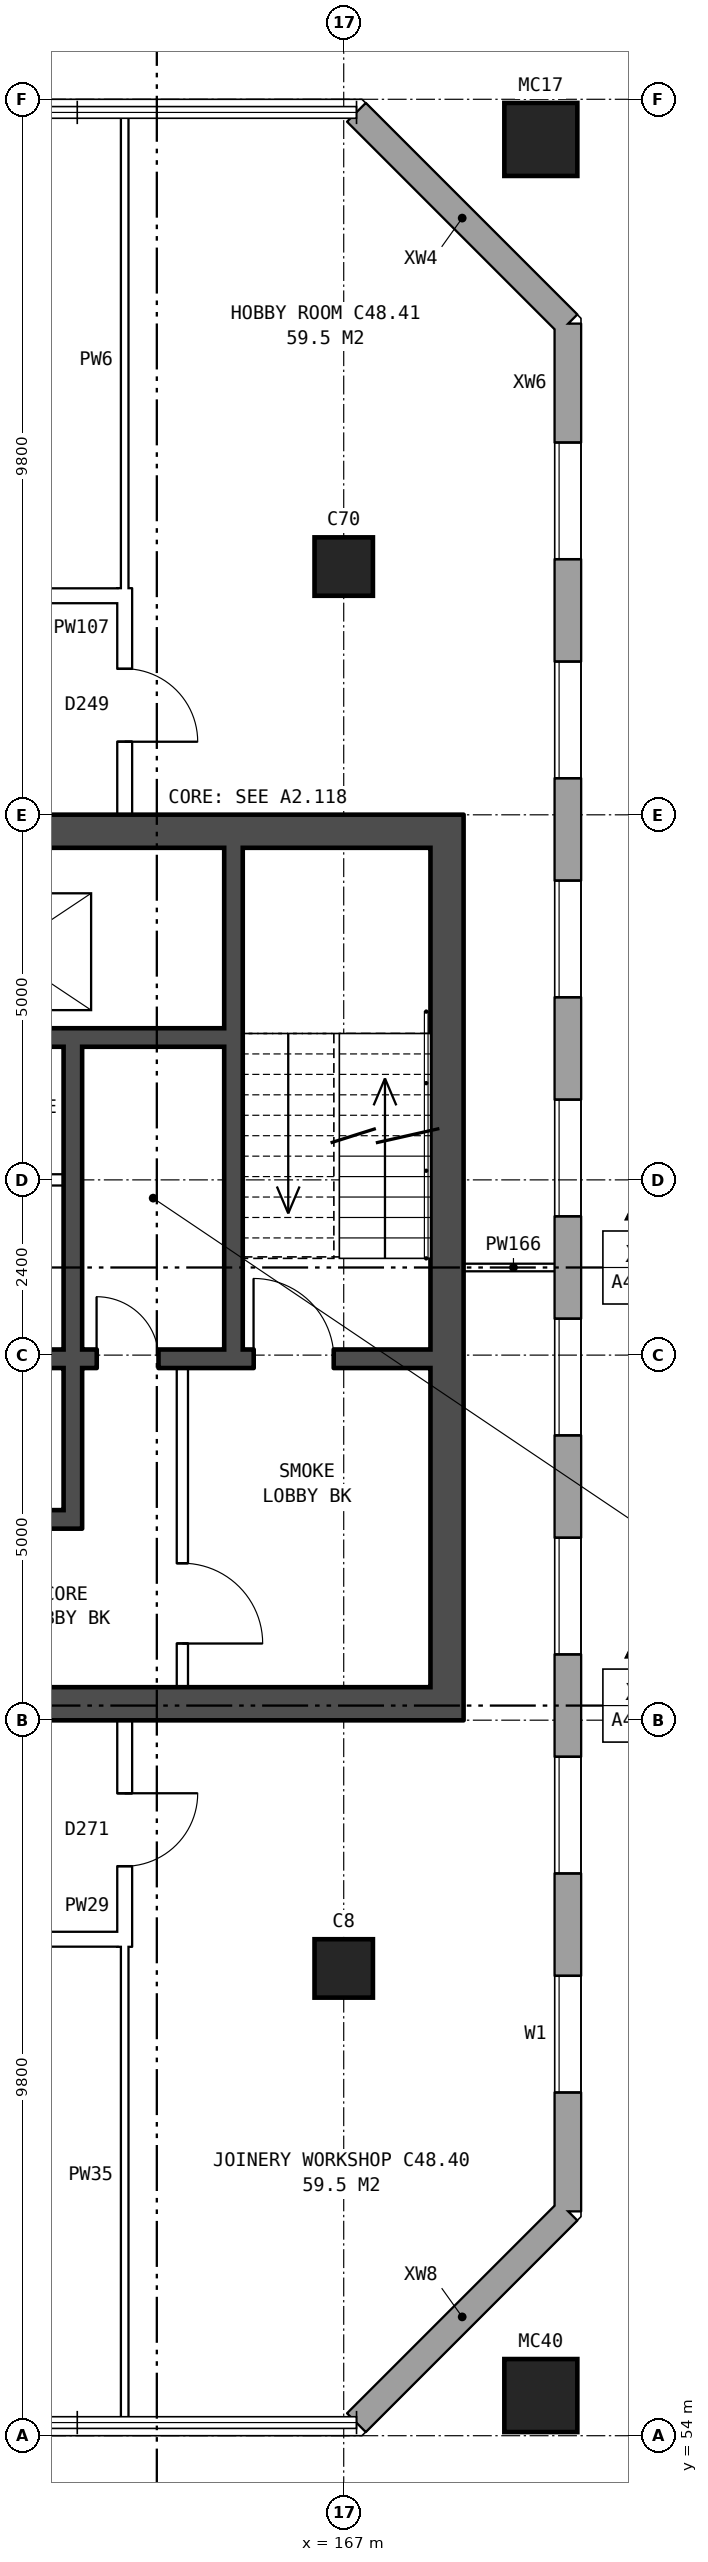
"""IFC4 building model, lengths in metres.
Left out: names, types, materials, properties, quantities, classifications, styles, units other than length and angle.
Written with IfcOpenShell. Run it as: python <this file> out.ifc"""

import sys

from ifc_helpers import new_model, si_unit, direction, frame, frame_2d, origin, origin_2d, place, context, subcontext, project, spatial, rectangle, hollow_rectangle, extrude, element, fill, save


model = new_model("IFC4")
c1 = context("Model", 3, precision=1e-05, world=origin(), true_north=direction((0.0, 1.0)))
c2 = subcontext(c1, "Body", "Model", "MODEL_VIEW")
j1 = project(units=[si_unit("LENGTHUNIT", "METRE"), si_unit("PLANEANGLEUNIT", "RADIAN")], contexts=[c1])
p1 = place(None, origin())
s1 = spatial("IfcSite", under=j1, at=p1, CompositionType="ELEMENT")
p2 = place(p1, origin())
s2 = spatial("IfcBuilding", under=s1, at=p2, CompositionType="ELEMENT")
p3 = place(p2, frame((0.0, 0.0, 171.6)))
s3 = spatial("IfcBuildingStorey", under=s2, at=p3, CompositionType="ELEMENT", Elevation=171.6)
for number, where, z_axis, x_axis in (
    (1, (167.0, 60.4, 0.0), (0.0, 0.0, 1.0), (1.0, 0.0, 0.0)),
    (2, (167.0, 79.6, 0.0), (0.0, 0.0, 1.0), (1.0, 0.0, 0.0)),
):
    element("IfcColumn", number, at=place(p3, frame(where, z_axis=z_axis, x_axis=x_axis)), inside=s3, PredefinedType="COLUMN", context=c2, shape_type="SweptSolid", body=[
        extrude(rectangle(XDim=0.8, YDim=0.8, at=origin_2d()), origin(), (0.0, 0.0, 1.0), 3.6),
    ])
for number, where, z_axis, x_axis in (
    (3, (169.7, 54.55, 0.0), (0.0, 0.0, 1.0), (1.0, 0.0, 0.0)),
    (4, (169.7, 85.45, 0.0), (0.0, 0.0, 1.0), (1.0, 0.0, 0.0)),
):
    element("IfcColumn", number, at=place(p3, frame(where, z_axis=z_axis, x_axis=x_axis)), inside=s3, PredefinedType="COLUMN", context=c2, shape_type="SweptSolid", body=[
        extrude(hollow_rectangle(XDim=1.0, YDim=1.0, WallThickness=0.055, at=origin_2d()), origin(), (0.0, 0.0, 1.0), 4.2),
    ])
p4 = place(p3, frame((167.175, 54.18, 0.0), z_axis=(0.0, 0.0, 1.0), x_axis=(0.707106781187, 0.707106781187, 0.0)))
e5 = element("IfcWall", 5, at=p4, inside=s3, PredefinedType="STANDARD", context=c2, shape_type="SweptSolid", body=[
    extrude(rectangle(XDim=4.094, YDim=0.36, at=frame_2d((2.047, 0.0))), origin(), (0.0, 0.0, 1.0), 3.6),
])
p5 = place(p3, frame((170.07, 57.075, 0.0), z_axis=(0.0, 0.0, 1.0), x_axis=(0.0, 1.0, 0.0)))
e6 = element("IfcWall", 6, at=p5, inside=s3, PredefinedType="STANDARD", context=c2, shape_type="SweptSolid", body=[
    extrude(rectangle(XDim=25.851, YDim=0.36, at=frame_2d((12.925, 0.0))), origin(), (0.0, 0.0, 1.0), 3.6),
])
p6 = place(p5, frame((1.625, 0.0, 0.8)))
e7 = element("IfcOpeningElement", 7, at=p6, cuts=e6, PredefinedType="OPENING", context=c2, shape_type="SweptSolid", body=[
    extrude(rectangle(XDim=1.6, YDim=1.8, at=frame_2d((0.8, 0.9))), frame((0.0, 0.19, 0.0), z_axis=(0.0, -1.0, 0.0), x_axis=(1.0, 0.0, 0.0)), (0.0, 0.0, 1.0), 0.38),
])
p7 = place(p5, frame((4.625, 0.0, 0.8)))
e8 = element("IfcOpeningElement", 8, at=p7, cuts=e6, PredefinedType="OPENING", context=c2, shape_type="SweptSolid", body=[
    extrude(rectangle(XDim=1.6, YDim=1.8, at=frame_2d((0.8, 0.9))), frame((0.0, 0.19, 0.0), z_axis=(0.0, -1.0, 0.0), x_axis=(1.0, 0.0, 0.0)), (0.0, 0.0, 1.0), 0.38),
])
p8 = place(p5, frame((7.625, 0.0, 0.8)))
e9 = element("IfcOpeningElement", 9, at=p8, cuts=e6, PredefinedType="OPENING", context=c2, shape_type="SweptSolid", body=[
    extrude(rectangle(XDim=1.6, YDim=1.8, at=frame_2d((0.8, 0.9))), frame((0.0, 0.19, 0.0), z_axis=(0.0, -1.0, 0.0), x_axis=(1.0, 0.0, 0.0)), (0.0, 0.0, 1.0), 0.38),
])
p9 = place(p5, frame((10.625, 0.0, 0.8)))
e10 = element("IfcOpeningElement", 10, at=p9, cuts=e6, PredefinedType="OPENING", context=c2, shape_type="SweptSolid", body=[
    extrude(rectangle(XDim=1.6, YDim=1.8, at=frame_2d((0.8, 0.9))), frame((0.0, 0.19, 0.0), z_axis=(0.0, -1.0, 0.0), x_axis=(1.0, 0.0, 0.0)), (0.0, 0.0, 1.0), 0.38),
])
p10 = place(p5, frame((13.625, 0.0, 0.8)))
e11 = element("IfcOpeningElement", 11, at=p10, cuts=e6, PredefinedType="OPENING", context=c2, shape_type="SweptSolid", body=[
    extrude(rectangle(XDim=1.6, YDim=1.8, at=frame_2d((0.8, 0.9))), frame((0.0, 0.19, 0.0), z_axis=(0.0, -1.0, 0.0), x_axis=(1.0, 0.0, 0.0)), (0.0, 0.0, 1.0), 0.38),
])
p11 = place(p5, frame((16.625, 0.0, 0.8)))
e12 = element("IfcOpeningElement", 12, at=p11, cuts=e6, PredefinedType="OPENING", context=c2, shape_type="SweptSolid", body=[
    extrude(rectangle(XDim=1.6, YDim=1.8, at=frame_2d((0.8, 0.9))), frame((0.0, 0.19, 0.0), z_axis=(0.0, -1.0, 0.0), x_axis=(1.0, 0.0, 0.0)), (0.0, 0.0, 1.0), 0.38),
])
p12 = place(p5, frame((19.625, 0.0, 0.8)))
e13 = element("IfcOpeningElement", 13, at=p12, cuts=e6, PredefinedType="OPENING", context=c2, shape_type="SweptSolid", body=[
    extrude(rectangle(XDim=1.6, YDim=1.8, at=frame_2d((0.8, 0.9))), frame((0.0, 0.19, 0.0), z_axis=(0.0, -1.0, 0.0), x_axis=(1.0, 0.0, 0.0)), (0.0, 0.0, 1.0), 0.38),
])
p13 = place(p5, frame((22.625, 0.0, 0.8)))
e14 = element("IfcOpeningElement", 14, at=p13, cuts=e6, PredefinedType="OPENING", context=c2, shape_type="SweptSolid", body=[
    extrude(rectangle(XDim=1.6, YDim=1.8, at=frame_2d((0.8, 0.9))), frame((0.0, 0.19, 0.0), z_axis=(0.0, -1.0, 0.0), x_axis=(1.0, 0.0, 0.0)), (0.0, 0.0, 1.0), 0.38),
])
p14 = place(p3, frame((170.07, 82.925, 0.0), z_axis=(0.0, 0.0, 1.0), x_axis=(-0.707106781187, 0.707106781187, 0.0)))
e15 = element("IfcWall", 15, at=p14, inside=s3, PredefinedType="STANDARD", context=c2, shape_type="SweptSolid", body=[
    extrude(rectangle(XDim=4.094, YDim=0.36, at=frame_2d((2.047, 0.0))), origin(), (0.0, 0.0, 1.0), 3.6),
])
p15 = place(p3, frame((168.415, 76.2, 0.0), z_axis=(0.0, 0.0, 1.0), x_axis=(0.0, -1.0, 0.0)))
e16 = element("IfcWall", 16, at=p15, inside=s3, PredefinedType="SHEAR", context=c2, shape_type="SweptSolid", body=[
    extrude(rectangle(XDim=12.4, YDim=0.45, at=frame_2d((6.2, 0.0))), origin(), (0.0, 0.0, 1.0), 3.6),
])
for number, where, z_axis, x_axis in (
    (17, (160.69, 75.975, 0.0), (0.0, 0.0, 1.0), (1.0, 0.0, 0.0)),
    (18, (160.69, 64.025, 0.0), (0.0, 0.0, 1.0), (1.0, 0.0, 0.0)),
):
    element("IfcWall", number, at=place(p3, frame(where, z_axis=z_axis, x_axis=x_axis)), inside=s3, PredefinedType="SHEAR", context=c2, shape_type="SweptSolid", body=[
        extrude(rectangle(XDim=7.5, YDim=0.45, at=frame_2d((3.75, 0.0))), origin(), (0.0, 0.0, 1.0), 3.6),
    ])
p16 = place(p3, frame((160.69, 73.15, 0.0), z_axis=(0.0, 0.0, 1.0), x_axis=(1.0, 0.0, 0.0)))
e19 = element("IfcWall", 19, at=p16, inside=s3, PredefinedType="SHEAR", context=c2, shape_type="SweptSolid", body=[
    extrude(rectangle(XDim=4.675, YDim=0.25, at=frame_2d((2.337, 0.0))), origin(), (0.0, 0.0, 1.0), 3.6),
])
p17 = place(p3, frame((160.69, 71.2, 0.0), z_axis=(0.0, 0.0, 1.0), x_axis=(1.0, 0.0, 0.0)))
e20 = element("IfcWall", 20, at=p17, inside=s3, PredefinedType="PARTITIONING", context=c2, shape_type="SweptSolid", body=[
    extrude(rectangle(XDim=2.475, YDim=0.15, at=frame_2d((1.238, 0.0))), origin(), (0.0, 0.0, 1.0), 3.6),
])
p18 = place(p3, frame((160.69, 68.75, 0.0), z_axis=(0.0, 0.0, 1.0), x_axis=(1.0, 0.0, 0.0)))
e21 = element("IfcWall", 21, at=p18, inside=s3, PredefinedType="SHEAR", context=c2, shape_type="SweptSolid", body=[
    extrude(rectangle(XDim=7.5, YDim=0.25, at=frame_2d((3.75, 0.0))), origin(), (0.0, 0.0, 1.0), 3.6),
])
p19 = place(p18, frame((5.075, 0.0, 0.0)))
e22 = element("IfcOpeningElement", 22, at=p19, cuts=e21, PredefinedType="OPENING", context=c2, shape_type="SweptSolid", body=[
    extrude(rectangle(XDim=1.1, YDim=2.1, at=frame_2d((0.55, 1.05))), frame((0.0, 0.135, 0.0), z_axis=(0.0, -1.0, 0.0), x_axis=(1.0, 0.0, 0.0)), (0.0, 0.0, 1.0), 0.27),
])
p20 = place(p18, frame((2.925, 0.0, 0.0)))
e23 = element("IfcOpeningElement", 23, at=p20, cuts=e21, PredefinedType="OPENING", context=c2, shape_type="SweptSolid", body=[
    extrude(rectangle(XDim=0.85, YDim=2.1, at=frame_2d((0.425, 1.05))), frame((0.0, 0.135, 0.0), z_axis=(0.0, -1.0, 0.0), x_axis=(1.0, 0.0, 0.0)), (0.0, 0.0, 1.0), 0.27),
])
p21 = place(p3, frame((160.69, 66.55, 0.0), z_axis=(0.0, 0.0, 1.0), x_axis=(1.0, 0.0, 0.0)))
e24 = element("IfcWall", 24, at=p21, inside=s3, PredefinedType="SHEAR", context=c2, shape_type="SweptSolid", body=[
    extrude(rectangle(XDim=2.475, YDim=0.25, at=frame_2d((1.238, 0.0))), origin(), (0.0, 0.0, 1.0), 3.6),
])
p22 = place(p3, frame((163.29, 73.025, 0.0), z_axis=(0.0, 0.0, 1.0), x_axis=(0.0, -1.0, 0.0)))
e25 = element("IfcWall", 25, at=p22, inside=s3, PredefinedType="SHEAR", context=c2, shape_type="SweptSolid", body=[
    extrude(rectangle(XDim=4.15, YDim=0.25, at=frame_2d((2.075, 0.0))), origin(), (0.0, 0.0, 1.0), 3.6),
])
p23 = place(p3, frame((163.29, 68.625, 0.0), z_axis=(0.0, 0.0, 1.0), x_axis=(0.0, -1.0, 0.0)))
e26 = element("IfcWall", 26, at=p23, inside=s3, PredefinedType="SHEAR", context=c2, shape_type="SweptSolid", body=[
    extrude(rectangle(XDim=2.2, YDim=0.25, at=frame_2d((1.1, 0.0))), origin(), (0.0, 0.0, 1.0), 3.6),
])
p24 = place(p3, frame((164.79, 68.625, 0.0), z_axis=(0.0, 0.0, 1.0), x_axis=(0.0, -1.0, 0.0)))
e27 = element("IfcWall", 27, at=p24, inside=s3, PredefinedType="PARTITIONING", context=c2, shape_type="SweptSolid", body=[
    extrude(rectangle(XDim=4.375, YDim=0.15, at=frame_2d((2.188, 0.0))), origin(), (0.0, 0.0, 1.0), 3.6),
])
p25 = place(p24, frame((2.675, 0.0, 0.0)))
e28 = element("IfcOpeningElement", 28, at=p25, cuts=e27, PredefinedType="OPENING", context=c2, shape_type="SweptSolid", body=[
    extrude(rectangle(XDim=1.1, YDim=2.1, at=frame_2d((0.55, 1.05))), frame((0.0, 0.085, 0.0), z_axis=(0.0, -1.0, 0.0), x_axis=(1.0, 0.0, 0.0)), (0.0, 0.0, 1.0), 0.17),
])
p26 = place(p3, frame((165.49, 75.75, 0.0), z_axis=(0.0, 0.0, 1.0), x_axis=(0.0, -1.0, 0.0)))
e29 = element("IfcWall", 29, at=p26, inside=s3, PredefinedType="SHEAR", context=c2, shape_type="SweptSolid", body=[
    extrude(rectangle(XDim=6.875, YDim=0.25, at=frame_2d((3.438, 0.0))), origin(), (0.0, 0.0, 1.0), 3.6),
])
p27 = place(p3, frame((157.14, 60.8, 0.0), z_axis=(0.0, 0.0, 1.0), x_axis=(1.0, 0.0, 0.0)))
e30 = element("IfcWall", 30, at=p27, inside=s3, PredefinedType="PARTITIONING", context=c2, shape_type="SweptSolid", body=[
    extrude(rectangle(XDim=6.96, YDim=0.2, at=frame_2d((3.48, 0.0))), origin(), (0.0, 0.0, 1.0), 3.6),
])
p28 = place(p27, frame((3.36, 0.0, 0.0)))
e31 = element("IfcOpeningElement", 31, at=p28, cuts=e30, PredefinedType="OPENING", context=c2, shape_type="SweptSolid", body=[
    extrude(rectangle(XDim=1.0, YDim=2.1, at=frame_2d((0.5, 1.05))), frame((0.0, 0.11, 0.0), z_axis=(0.0, -1.0, 0.0), x_axis=(1.0, 0.0, 0.0)), (0.0, 0.0, 1.0), 0.22),
])
p29 = place(p3, frame((168.64, 70.0, 0.0), z_axis=(0.0, 0.0, 1.0), x_axis=(1.0, 0.0, 0.0)))
e32 = element("IfcWall", 32, at=p29, inside=s3, PredefinedType="PARTITIONING", context=c2, shape_type="SweptSolid", body=[
    extrude(rectangle(XDim=1.37, YDim=0.1, at=frame_2d((0.685, 0.0))), origin(), (0.0, 0.0, 1.0), 3.6),
])
p30 = place(p3, frame((157.14, 79.2, 0.0), z_axis=(0.0, 0.0, 1.0), x_axis=(1.0, 0.0, 0.0)))
e33 = element("IfcWall", 33, at=p30, inside=s3, PredefinedType="PARTITIONING", context=c2, shape_type="SweptSolid", body=[
    extrude(rectangle(XDim=6.96, YDim=0.2, at=frame_2d((3.48, 0.0))), origin(), (0.0, 0.0, 1.0), 3.6),
])
p31 = place(p30, frame((3.36, 0.0, 0.0)))
e34 = element("IfcOpeningElement", 34, at=p31, cuts=e33, PredefinedType="OPENING", context=c2, shape_type="SweptSolid", body=[
    extrude(rectangle(XDim=1.0, YDim=2.1, at=frame_2d((0.5, 1.05))), frame((0.0, 0.11, 0.0), z_axis=(0.0, -1.0, 0.0), x_axis=(1.0, 0.0, 0.0)), (0.0, 0.0, 1.0), 0.22),
])
p32 = place(p3, frame((164.0, 60.698, 0.0), z_axis=(0.0, 0.0, 1.0), x_axis=(0.0, 1.0, 0.0)))
e35 = element("IfcWall", 35, at=p32, inside=s3, PredefinedType="PARTITIONING", context=c2, shape_type="SweptSolid", body=[
    extrude(rectangle(XDim=3.102, YDim=0.2, at=frame_2d((1.551, 0.0))), origin(), (0.0, 0.0, 1.0), 3.6),
])
p33 = place(p32, frame((1.101, 0.0, 0.0)))
e36 = element("IfcOpeningElement", 36, at=p33, cuts=e35, PredefinedType="OPENING", context=c2, shape_type="SweptSolid", body=[
    extrude(rectangle(XDim=1.0, YDim=2.1, at=frame_2d((0.5, 1.05))), frame((0.0, 0.11, 0.0), z_axis=(0.0, -1.0, 0.0), x_axis=(1.0, 0.0, 0.0)), (0.0, 0.0, 1.0), 0.22),
])
p34 = place(p3, frame((164.0, 76.2, 0.0), z_axis=(0.0, 0.0, 1.0), x_axis=(0.0, 1.0, 0.0)))
e37 = element("IfcWall", 37, at=p34, inside=s3, PredefinedType="PARTITIONING", context=c2, shape_type="SweptSolid", body=[
    extrude(rectangle(XDim=3.102, YDim=0.2, at=frame_2d((1.551, 0.0))), origin(), (0.0, 0.0, 1.0), 3.6),
])
p35 = place(p34, frame((1.001, 0.0, 0.0)))
e38 = element("IfcOpeningElement", 38, at=p35, cuts=e37, PredefinedType="OPENING", context=c2, shape_type="SweptSolid", body=[
    extrude(rectangle(XDim=1.0, YDim=2.1, at=frame_2d((0.5, 1.05))), frame((0.0, 0.11, 0.0), z_axis=(0.0, -1.0, 0.0), x_axis=(1.0, 0.0, 0.0)), (0.0, 0.0, 1.0), 0.22),
])
for number, where, z_axis, x_axis in (
    (39, (164.0, 54.24, 0.0), (0.0, 0.0, 1.0), (0.0, 1.0, 0.0)),
    (40, (164.0, 79.098, 0.0), (0.0, 0.0, 1.0), (0.0, 1.0, 0.0)),
):
    element("IfcWall", number, at=place(p3, frame(where, z_axis=z_axis, x_axis=x_axis)), inside=s3, PredefinedType="PARTITIONING", context=c2, shape_type="SweptSolid", body=[
        extrude(rectangle(XDim=6.662, YDim=0.1, at=frame_2d((3.331, 0.0))), origin(), (0.0, 0.0, 1.0), 3.6),
    ])
p36 = place(p6, origin())
e41 = element("IfcWindow", 41, at=p36, inside=s3, PartitioningType="SINGLE_PANEL", PredefinedType="WINDOW", context=c2, shape_type="SweptSolid", body=[
    extrude(rectangle(XDim=1.6, YDim=1.8, at=frame_2d((0.8, 0.9))), frame((0.0, 0.15, 0.0), z_axis=(0.0, -1.0, 0.0), x_axis=(1.0, 0.0, 0.0)), (0.0, 0.0, 1.0), 0.06),
])
fill(e7, e41)
p37 = place(p7, origin())
e42 = element("IfcWindow", 42, at=p37, inside=s3, PartitioningType="SINGLE_PANEL", PredefinedType="WINDOW", context=c2, shape_type="SweptSolid", body=[
    extrude(rectangle(XDim=1.6, YDim=1.8, at=frame_2d((0.8, 0.9))), frame((0.0, 0.15, 0.0), z_axis=(0.0, -1.0, 0.0), x_axis=(1.0, 0.0, 0.0)), (0.0, 0.0, 1.0), 0.06),
])
fill(e8, e42)
p38 = place(p8, origin())
e43 = element("IfcWindow", 43, at=p38, inside=s3, PartitioningType="SINGLE_PANEL", PredefinedType="WINDOW", context=c2, shape_type="SweptSolid", body=[
    extrude(rectangle(XDim=1.6, YDim=1.8, at=frame_2d((0.8, 0.9))), frame((0.0, 0.15, 0.0), z_axis=(0.0, -1.0, 0.0), x_axis=(1.0, 0.0, 0.0)), (0.0, 0.0, 1.0), 0.06),
])
fill(e9, e43)
p39 = place(p9, origin())
e44 = element("IfcWindow", 44, at=p39, inside=s3, PartitioningType="SINGLE_PANEL", PredefinedType="WINDOW", context=c2, shape_type="SweptSolid", body=[
    extrude(rectangle(XDim=1.6, YDim=1.8, at=frame_2d((0.8, 0.9))), frame((0.0, 0.15, 0.0), z_axis=(0.0, -1.0, 0.0), x_axis=(1.0, 0.0, 0.0)), (0.0, 0.0, 1.0), 0.06),
])
fill(e10, e44)
p40 = place(p10, origin())
e45 = element("IfcWindow", 45, at=p40, inside=s3, PartitioningType="SINGLE_PANEL", PredefinedType="WINDOW", context=c2, shape_type="SweptSolid", body=[
    extrude(rectangle(XDim=1.6, YDim=1.8, at=frame_2d((0.8, 0.9))), frame((0.0, 0.15, 0.0), z_axis=(0.0, -1.0, 0.0), x_axis=(1.0, 0.0, 0.0)), (0.0, 0.0, 1.0), 0.06),
])
fill(e11, e45)
p41 = place(p11, origin())
e46 = element("IfcWindow", 46, at=p41, inside=s3, PartitioningType="SINGLE_PANEL", PredefinedType="WINDOW", context=c2, shape_type="SweptSolid", body=[
    extrude(rectangle(XDim=1.6, YDim=1.8, at=frame_2d((0.8, 0.9))), frame((0.0, 0.15, 0.0), z_axis=(0.0, -1.0, 0.0), x_axis=(1.0, 0.0, 0.0)), (0.0, 0.0, 1.0), 0.06),
])
fill(e12, e46)
p42 = place(p12, origin())
e47 = element("IfcWindow", 47, at=p42, inside=s3, PartitioningType="SINGLE_PANEL", PredefinedType="WINDOW", context=c2, shape_type="SweptSolid", body=[
    extrude(rectangle(XDim=1.6, YDim=1.8, at=frame_2d((0.8, 0.9))), frame((0.0, 0.15, 0.0), z_axis=(0.0, -1.0, 0.0), x_axis=(1.0, 0.0, 0.0)), (0.0, 0.0, 1.0), 0.06),
])
fill(e13, e47)
p43 = place(p13, origin())
e48 = element("IfcWindow", 48, at=p43, inside=s3, PartitioningType="SINGLE_PANEL", PredefinedType="WINDOW", context=c2, shape_type="SweptSolid", body=[
    extrude(rectangle(XDim=1.6, YDim=1.8, at=frame_2d((0.8, 0.9))), frame((0.0, 0.15, 0.0), z_axis=(0.0, -1.0, 0.0), x_axis=(1.0, 0.0, 0.0)), (0.0, 0.0, 1.0), 0.06),
])
fill(e14, e48)
p44 = place(p25, origin())
e49 = element("IfcDoor", 49, at=p44, inside=s3, OperationType="SINGLE_SWING_RIGHT", PredefinedType="DOOR", context=c2, shape_type="SweptSolid", body=[
    extrude(rectangle(XDim=1.1, YDim=2.1, at=frame_2d((0.55, 1.05))), frame((0.0, 0.025, 0.0), z_axis=(0.0, -1.0, 0.0), x_axis=(1.0, 0.0, 0.0)), (0.0, 0.0, 1.0), 0.05),
])
fill(e28, e49)
p45 = place(p19, origin())
e50 = element("IfcDoor", 50, at=p45, inside=s3, OperationType="SINGLE_SWING_LEFT", PredefinedType="DOOR", context=c2, shape_type="SweptSolid", body=[
    extrude(rectangle(XDim=1.1, YDim=2.1, at=frame_2d((0.55, 1.05))), frame((0.0, 0.025, 0.0), z_axis=(0.0, -1.0, 0.0), x_axis=(1.0, 0.0, 0.0)), (0.0, 0.0, 1.0), 0.05),
])
fill(e22, e50)
p46 = place(p20, origin())
e51 = element("IfcDoor", 51, at=p46, inside=s3, OperationType="SINGLE_SWING_LEFT", PredefinedType="DOOR", context=c2, shape_type="SweptSolid", body=[
    extrude(rectangle(XDim=0.85, YDim=2.1, at=frame_2d((0.425, 1.05))), frame((0.0, 0.025, 0.0), z_axis=(0.0, -1.0, 0.0), x_axis=(1.0, 0.0, 0.0)), (0.0, 0.0, 1.0), 0.05),
])
fill(e23, e51)
p47 = place(p33, frame((1.0, 0.0, 0.0), z_axis=(0.0, 0.0, 1.0), x_axis=(-1.0, 0.0, 0.0)))
e52 = element("IfcDoor", 52, at=p47, inside=s3, OperationType="SINGLE_SWING_LEFT", PredefinedType="DOOR", context=c2, shape_type="SweptSolid", body=[
    extrude(rectangle(XDim=1.0, YDim=2.1, at=frame_2d((0.5, 1.05))), frame((0.0, 0.025, 0.0), z_axis=(0.0, -1.0, 0.0), x_axis=(1.0, 0.0, 0.0)), (0.0, 0.0, 1.0), 0.05),
])
fill(e36, e52)
p48 = place(p35, frame((1.0, 0.0, 0.0), z_axis=(0.0, 0.0, 1.0), x_axis=(-1.0, 0.0, 0.0)))
e53 = element("IfcDoor", 53, at=p48, inside=s3, OperationType="SINGLE_SWING_RIGHT", PredefinedType="DOOR", context=c2, shape_type="SweptSolid", body=[
    extrude(rectangle(XDim=1.0, YDim=2.1, at=frame_2d((0.5, 1.05))), frame((0.0, 0.025, 0.0), z_axis=(0.0, -1.0, 0.0), x_axis=(1.0, 0.0, 0.0)), (0.0, 0.0, 1.0), 0.05),
])
fill(e38, e53)
save(model, sys.argv[1])
